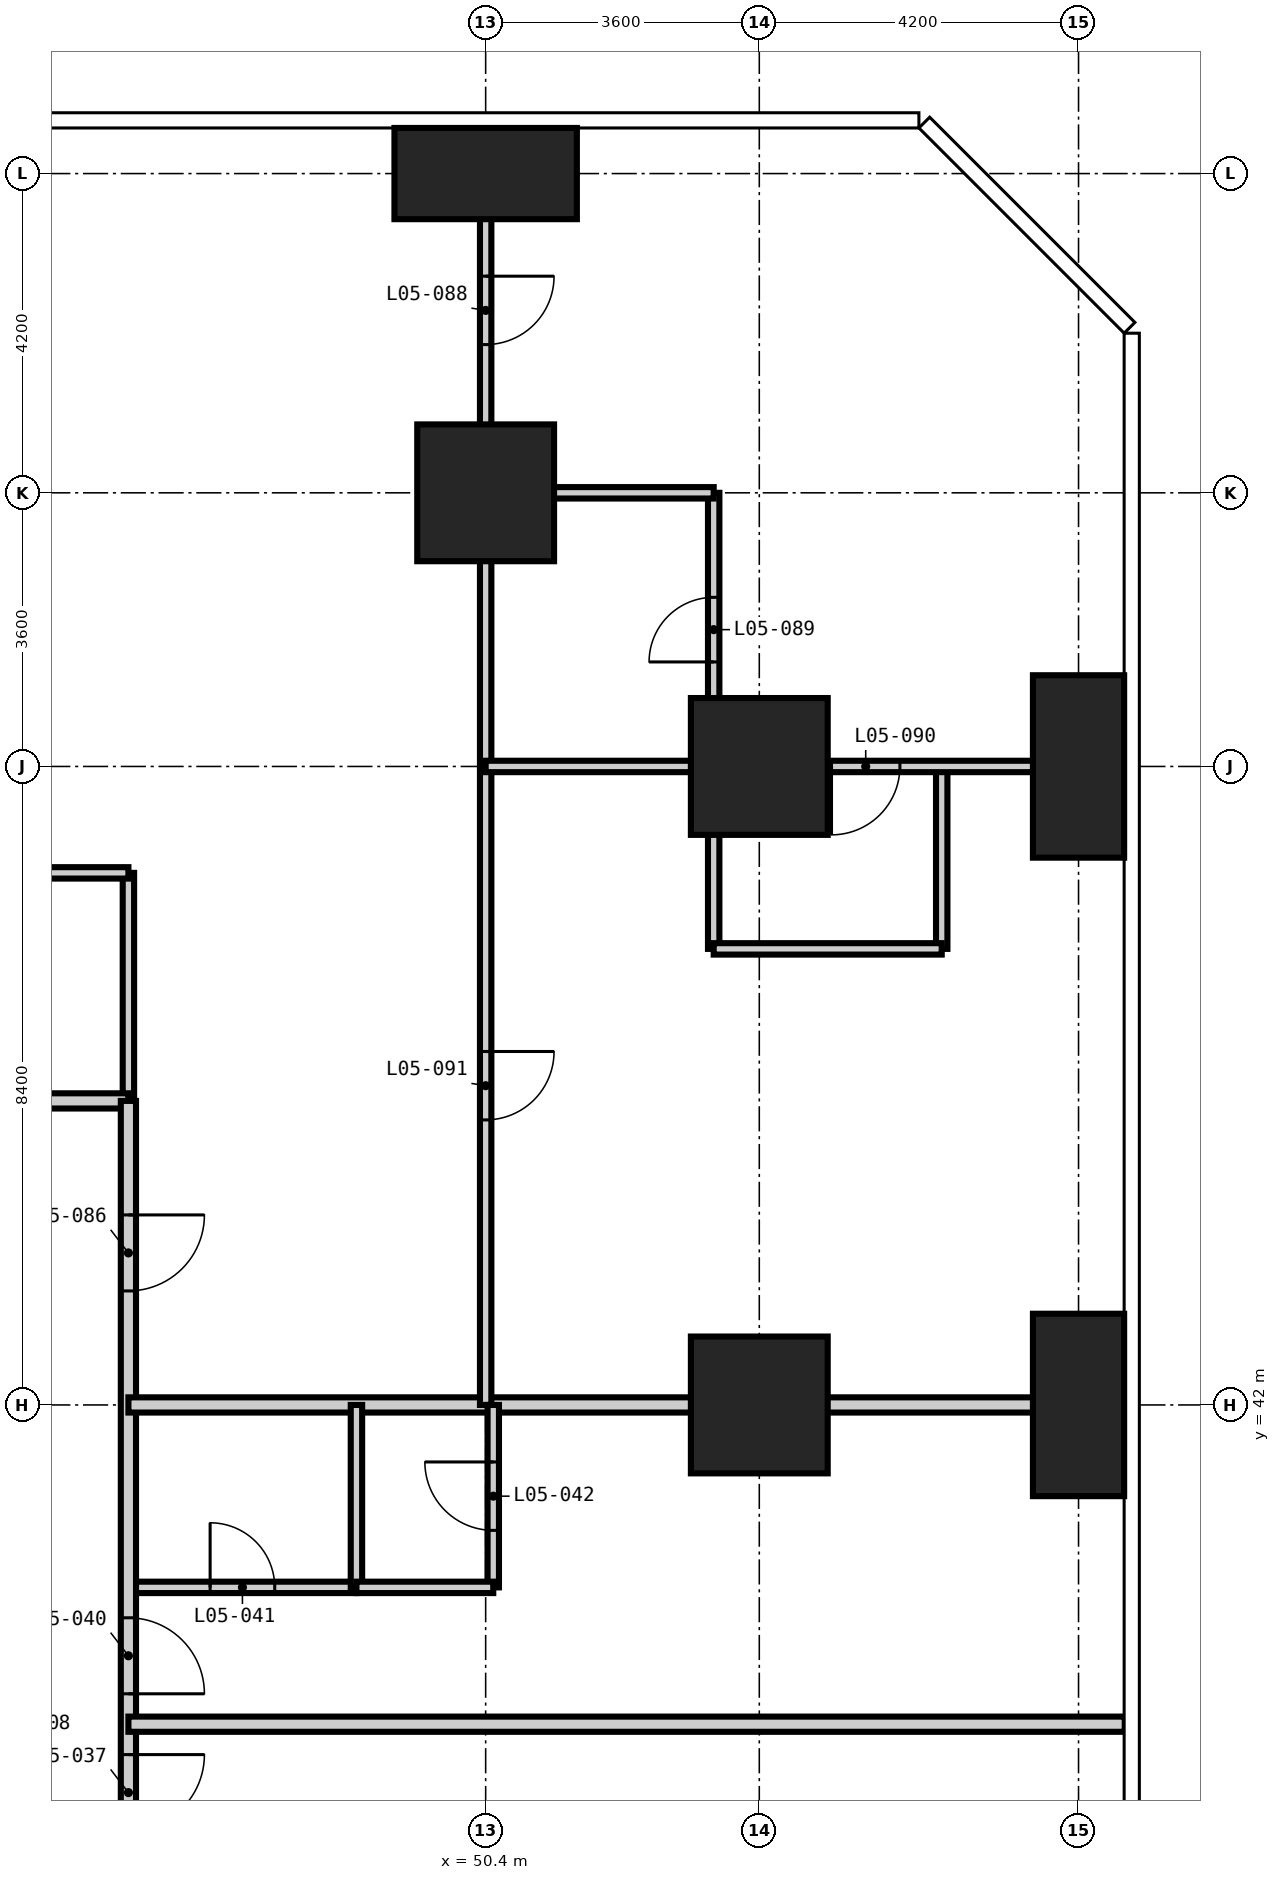
"""IFC4 building model, lengths in metres.
Left out: names, types, materials, properties, quantities, classifications, styles, units other than length and angle.
Written with IfcOpenShell. Run it as: python <this file> out.ifc"""

import sys

from ifc_helpers import new_model, si_unit, direction, frame, frame_2d, origin, origin_2d, place, context, subcontext, project, spatial, rectangle, extrude, element, fill, save


model = new_model("IFC4")
c1 = context("Model", 3, precision=1e-05, world=origin(), true_north=direction((0.0, 1.0)))
c2 = subcontext(c1, "Body", "Model", "MODEL_VIEW")
j1 = project(units=[si_unit("LENGTHUNIT", "METRE"), si_unit("PLANEANGLEUNIT", "RADIAN")], contexts=[c1])
p1 = place(None, origin())
s1 = spatial("IfcSite", under=j1, at=p1, CompositionType="ELEMENT")
p2 = place(p1, origin())
s2 = spatial("IfcBuilding", under=s1, at=p2, CompositionType="ELEMENT")
p3 = place(p2, frame((0.0, 0.0, 27.0)))
s3 = spatial("IfcBuildingStorey", under=s2, at=p3, CompositionType="ELEMENT", Elevation=27.0)
p4 = place(p3, frame((50.4, 54.0, -0.35), z_axis=(0.0, 0.0, 1.0), x_axis=(1.0, 0.0, 0.0)))
e1 = element("IfcColumn", 1, at=p4, inside=s3, PredefinedType="COLUMN", context=c2, shape_type="SweptSolid", body=[
    extrude(rectangle(XDim=1.8, YDim=1.8, at=origin_2d()), origin(), (0.0, 0.0, 1.0), 3.6),
])
p5 = place(p3, frame((50.4, 58.2, -0.35), z_axis=(0.0, 0.0, 1.0), x_axis=(1.0, 0.0, 0.0)))
e2 = element("IfcColumn", 2, at=p5, inside=s3, PredefinedType="COLUMN", context=c2, shape_type="SweptSolid", body=[
    extrude(rectangle(XDim=2.4, YDim=1.2, at=origin_2d()), origin(), (0.0, 0.0, 1.0), 3.6),
])
for number, where, z_axis, x_axis in (
    (3, (54.0, 42.0, -0.35), (0.0, 0.0, 1.0), (1.0, 0.0, 0.0)),
    (4, (54.0, 50.4, -0.35), (0.0, 0.0, 1.0), (1.0, 0.0, 0.0)),
):
    element("IfcColumn", number, at=place(p3, frame(where, z_axis=z_axis, x_axis=x_axis)), inside=s3, PredefinedType="COLUMN", context=c2, shape_type="SweptSolid", body=[
        extrude(rectangle(XDim=1.8, YDim=1.8, at=origin_2d()), origin(), (0.0, 0.0, 1.0), 3.6),
    ])
for number, where, z_axis, x_axis in (
    (5, (58.2, 42.0, -0.35), (0.0, 0.0, 1.0), (1.0, 0.0, 0.0)),
    (6, (58.2, 50.4, -0.35), (0.0, 0.0, 1.0), (1.0, 0.0, 0.0)),
):
    element("IfcColumn", number, at=place(p3, frame(where, z_axis=z_axis, x_axis=x_axis)), inside=s3, PredefinedType="COLUMN", context=c2, shape_type="SweptSolid", body=[
        extrude(rectangle(XDim=1.2, YDim=2.4, at=origin_2d()), origin(), (0.0, 0.0, 1.0), 3.6),
    ])
p6 = place(p3, frame((45.7, 46.0, 0.0), z_axis=(0.0, 0.0, 1.0), x_axis=(0.0, 1.0, 0.0)))
e7 = element("IfcWall", 7, at=p6, inside=s3, PredefinedType="PARTITIONING", context=c2, shape_type="SweptSolid", body=[
    extrude(rectangle(XDim=3.0, YDim=0.15, at=frame_2d((1.5, 0.0))), origin(), (0.0, 0.0, 1.0), 3.25),
])
p7 = place(p3, frame((53.4, 50.4, 0.0), z_axis=(0.0, 0.0, 1.0), x_axis=(0.0, 1.0, 0.0)))
e8 = element("IfcWall", 8, at=p7, inside=s3, PredefinedType="PARTITIONING", context=c2, shape_type="SweptSolid", body=[
    extrude(rectangle(XDim=3.6, YDim=0.15, at=frame_2d((1.8, 0.0))), origin(), (0.0, 0.0, 1.0), 3.25),
])
p8 = place(p7, frame((1.375, 0.0, 0.0)))
e9 = element("IfcOpeningElement", 9, at=p8, cuts=e8, PredefinedType="OPENING", context=c2, shape_type="SweptSolid", body=[
    extrude(rectangle(XDim=0.85, YDim=2.1, at=frame_2d((0.425, 1.05))), frame((0.0, 0.085, 0.0), z_axis=(0.0, -1.0, 0.0), x_axis=(1.0, 0.0, 0.0)), (0.0, 0.0, 1.0), 0.17),
])
p9 = place(p3, frame((45.7, 39.6, 0.0), z_axis=(0.0, 0.0, 1.0), x_axis=(1.0, 0.0, 0.0)))
e10 = element("IfcWall", 10, at=p9, inside=s3, PredefinedType="PARTITIONING", context=c2, shape_type="SweptSolid", body=[
    extrude(rectangle(XDim=3.0, YDim=0.15, at=frame_2d((1.5, 0.0))), origin(), (0.0, 0.0, 1.0), 3.25),
])
p10 = place(p9, frame((1.075, 0.0, 0.0)))
e11 = element("IfcOpeningElement", 11, at=p10, cuts=e10, PredefinedType="OPENING", context=c2, shape_type="SweptSolid", body=[
    extrude(rectangle(XDim=0.85, YDim=2.1, at=frame_2d((0.425, 1.05))), frame((0.0, 0.085, 0.0), z_axis=(0.0, -1.0, 0.0), x_axis=(1.0, 0.0, 0.0)), (0.0, 0.0, 1.0), 0.17),
])
p11 = place(p3, frame((42.0, 49.0, 0.0), z_axis=(0.0, 0.0, 1.0), x_axis=(1.0, 0.0, 0.0)))
e12 = element("IfcWall", 12, at=p11, inside=s3, PredefinedType="PARTITIONING", context=c2, shape_type="SweptSolid", body=[
    extrude(rectangle(XDim=3.7, YDim=0.15, at=frame_2d((1.85, 0.0))), origin(), (0.0, 0.0, 1.0), 3.25),
])
p12 = place(p11, frame((1.425, 0.0, 0.0)))
e13 = element("IfcOpeningElement", 13, at=p12, cuts=e12, PredefinedType="OPENING", context=c2, shape_type="SweptSolid", body=[
    extrude(rectangle(XDim=0.85, YDim=2.1, at=frame_2d((0.425, 1.05))), frame((0.0, 0.085, 0.0), z_axis=(0.0, -1.0, 0.0), x_axis=(1.0, 0.0, 0.0)), (0.0, 0.0, 1.0), 0.17),
])
p13 = place(p3, frame((50.4, 54.0, 0.0), z_axis=(0.0, 0.0, 1.0), x_axis=(1.0, 0.0, 0.0)))
e14 = element("IfcWall", 14, at=p13, inside=s3, PredefinedType="PARTITIONING", context=c2, shape_type="SweptSolid", body=[
    extrude(rectangle(XDim=3.0, YDim=0.15, at=frame_2d((1.5, 0.0))), origin(), (0.0, 0.0, 1.0), 3.25),
])
p14 = place(p3, frame((13.4, 46.0, 0.0), z_axis=(0.0, 0.0, 1.0), x_axis=(1.0, 0.0, 0.0)))
e15 = element("IfcWall", 15, at=p14, inside=s3, PredefinedType="PARTITIONING", context=c2, shape_type="SweptSolid", body=[
    extrude(rectangle(XDim=32.3, YDim=0.2, at=frame_2d((16.15, 0.0))), origin(), (0.0, 0.0, 1.0), 3.25),
])
p15 = place(p14, frame((6.2, 0.0, 0.0)))
e16 = element("IfcOpeningElement", 16, at=p15, cuts=e15, PredefinedType="OPENING", context=c2, shape_type="SweptSolid", body=[
    extrude(rectangle(XDim=1.0, YDim=2.2, at=frame_2d((0.5, 1.1))), frame((0.0, 0.11, 0.0), z_axis=(0.0, -1.0, 0.0), x_axis=(1.0, 0.0, 0.0)), (0.0, 0.0, 1.0), 0.22),
])
p16 = place(p14, frame((8.0, 0.0, 0.0)))
e17 = element("IfcOpeningElement", 17, at=p16, cuts=e15, PredefinedType="OPENING", context=c2, shape_type="SweptSolid", body=[
    extrude(rectangle(XDim=1.0, YDim=2.2, at=frame_2d((0.5, 1.1))), frame((0.0, 0.11, 0.0), z_axis=(0.0, -1.0, 0.0), x_axis=(1.0, 0.0, 0.0)), (0.0, 0.0, 1.0), 0.22),
])
p17 = place(p14, frame((14.6, 0.0, 0.0)))
e18 = element("IfcOpeningElement", 18, at=p17, cuts=e15, PredefinedType="OPENING", context=c2, shape_type="SweptSolid", body=[
    extrude(rectangle(XDim=1.0, YDim=2.2, at=frame_2d((0.5, 1.1))), frame((0.0, 0.11, 0.0), z_axis=(0.0, -1.0, 0.0), x_axis=(1.0, 0.0, 0.0)), (0.0, 0.0, 1.0), 0.22),
])
p18 = place(p14, frame((16.4, 0.0, 0.0)))
e19 = element("IfcOpeningElement", 19, at=p18, cuts=e15, PredefinedType="OPENING", context=c2, shape_type="SweptSolid", body=[
    extrude(rectangle(XDim=1.0, YDim=2.2, at=frame_2d((0.5, 1.1))), frame((0.0, 0.11, 0.0), z_axis=(0.0, -1.0, 0.0), x_axis=(1.0, 0.0, 0.0)), (0.0, 0.0, 1.0), 0.22),
])
p19 = place(p14, frame((23.0, 0.0, 0.0)))
e20 = element("IfcOpeningElement", 20, at=p19, cuts=e15, PredefinedType="OPENING", context=c2, shape_type="SweptSolid", body=[
    extrude(rectangle(XDim=1.0, YDim=2.2, at=frame_2d((0.5, 1.1))), frame((0.0, 0.11, 0.0), z_axis=(0.0, -1.0, 0.0), x_axis=(1.0, 0.0, 0.0)), (0.0, 0.0, 1.0), 0.22),
])
p20 = place(p14, frame((24.8, 0.0, 0.0)))
e21 = element("IfcOpeningElement", 21, at=p20, cuts=e15, PredefinedType="OPENING", context=c2, shape_type="SweptSolid", body=[
    extrude(rectangle(XDim=1.0, YDim=2.2, at=frame_2d((0.5, 1.1))), frame((0.0, 0.11, 0.0), z_axis=(0.0, -1.0, 0.0), x_axis=(1.0, 0.0, 0.0)), (0.0, 0.0, 1.0), 0.22),
])
p21 = place(p3, frame((45.7, 46.0, 0.0), z_axis=(0.0, 0.0, 1.0), x_axis=(0.0, -1.0, 0.0)))
e22 = element("IfcWall", 22, at=p21, inside=s3, PredefinedType="PARTITIONING", context=c2, shape_type="SweptSolid", body=[
    extrude(rectangle(XDim=32.6, YDim=0.2, at=frame_2d((16.3, 0.0))), origin(), (0.0, 0.0, 1.0), 3.25),
])
p22 = place(p21, frame((26.6, 0.0, 0.0)))
e23 = element("IfcOpeningElement", 23, at=p22, cuts=e22, PredefinedType="OPENING", context=c2, shape_type="SweptSolid", body=[
    extrude(rectangle(XDim=1.0, YDim=2.2, at=frame_2d((0.5, 1.1))), frame((0.0, 0.11, 0.0), z_axis=(0.0, -1.0, 0.0), x_axis=(1.0, 0.0, 0.0)), (0.0, 0.0, 1.0), 0.22),
])
p23 = place(p21, frame((22.4, 0.0, 0.0)))
e24 = element("IfcOpeningElement", 24, at=p23, cuts=e22, PredefinedType="OPENING", context=c2, shape_type="SweptSolid", body=[
    extrude(rectangle(XDim=1.0, YDim=2.2, at=frame_2d((0.5, 1.1))), frame((0.0, 0.11, 0.0), z_axis=(0.0, -1.0, 0.0), x_axis=(1.0, 0.0, 0.0)), (0.0, 0.0, 1.0), 0.22),
])
p24 = place(p21, frame((17.0, 0.0, 0.0)))
e25 = element("IfcOpeningElement", 25, at=p24, cuts=e22, PredefinedType="OPENING", context=c2, shape_type="SweptSolid", body=[
    extrude(rectangle(XDim=1.0, YDim=2.2, at=frame_2d((0.5, 1.1))), frame((0.0, 0.11, 0.0), z_axis=(0.0, -1.0, 0.0), x_axis=(1.0, 0.0, 0.0)), (0.0, 0.0, 1.0), 0.22),
])
p25 = place(p21, frame((15.2, 0.0, 0.0)))
e26 = element("IfcOpeningElement", 26, at=p25, cuts=e22, PredefinedType="OPENING", context=c2, shape_type="SweptSolid", body=[
    extrude(rectangle(XDim=1.0, YDim=2.2, at=frame_2d((0.5, 1.1))), frame((0.0, 0.11, 0.0), z_axis=(0.0, -1.0, 0.0), x_axis=(1.0, 0.0, 0.0)), (0.0, 0.0, 1.0), 0.22),
])
p26 = place(p21, frame((8.6, 0.0, 0.0)))
e27 = element("IfcOpeningElement", 27, at=p26, cuts=e22, PredefinedType="OPENING", context=c2, shape_type="SweptSolid", body=[
    extrude(rectangle(XDim=1.0, YDim=2.2, at=frame_2d((0.5, 1.1))), frame((0.0, 0.11, 0.0), z_axis=(0.0, -1.0, 0.0), x_axis=(1.0, 0.0, 0.0)), (0.0, 0.0, 1.0), 0.22),
])
p27 = place(p21, frame((6.8, 0.0, 0.0)))
e28 = element("IfcOpeningElement", 28, at=p27, cuts=e22, PredefinedType="OPENING", context=c2, shape_type="SweptSolid", body=[
    extrude(rectangle(XDim=1.0, YDim=2.2, at=frame_2d((0.5, 1.1))), frame((0.0, 0.11, 0.0), z_axis=(0.0, -1.0, 0.0), x_axis=(1.0, 0.0, 0.0)), (0.0, 0.0, 1.0), 0.22),
])
p28 = place(p21, frame((30.4, 0.0, 0.0)))
e29 = element("IfcOpeningElement", 29, at=p28, cuts=e22, PredefinedType="OPENING", context=c2, shape_type="SweptSolid", body=[
    extrude(rectangle(XDim=1.0, YDim=2.2, at=frame_2d((0.5, 1.1))), frame((0.0, 0.11, 0.0), z_axis=(0.0, -1.0, 0.0), x_axis=(1.0, 0.0, 0.0)), (0.0, 0.0, 1.0), 0.22),
])
p29 = place(p21, frame((1.5, 0.0, 0.0)))
e30 = element("IfcOpeningElement", 30, at=p29, cuts=e22, PredefinedType="OPENING", context=c2, shape_type="SweptSolid", body=[
    extrude(rectangle(XDim=1.0, YDim=2.2, at=frame_2d((0.5, 1.1))), frame((0.0, 0.11, 0.0), z_axis=(0.0, -1.0, 0.0), x_axis=(1.0, 0.0, 0.0)), (0.0, 0.0, 1.0), 0.22),
])
for number, where, z_axis, x_axis in (
    (31, (45.7, 37.8, 0.0), (0.0, 0.0, 1.0), (1.0, 0.0, 0.0)),
    (32, (45.7, 42.0, 0.0), (0.0, 0.0, 1.0), (1.0, 0.0, 0.0)),
):
    element("IfcWall", number, at=place(p3, frame(where, z_axis=z_axis, x_axis=x_axis)), inside=s3, PredefinedType="PARTITIONING", context=c2, shape_type="SweptSolid", body=[
        extrude(rectangle(XDim=13.108, YDim=0.2, at=frame_2d((6.554, 0.0))), origin(), (0.0, 0.0, 1.0), 3.25),
    ])
p30 = place(p3, frame((48.7, 39.6, 0.0), z_axis=(0.0, 0.0, 1.0), x_axis=(0.0, 1.0, 0.0)))
e33 = element("IfcWall", 33, at=p30, inside=s3, PredefinedType="PARTITIONING", context=c2, shape_type="SweptSolid", body=[
    extrude(rectangle(XDim=2.4, YDim=0.15, at=frame_2d((1.2, 0.0))), origin(), (0.0, 0.0, 1.0), 3.25),
])
p31 = place(p3, frame((50.4, 42.0, 0.0), z_axis=(0.0, 0.0, 1.0), x_axis=(0.0, 1.0, 0.0)))
e34 = element("IfcWall", 34, at=p31, inside=s3, PredefinedType="PARTITIONING", context=c2, shape_type="SweptSolid", body=[
    extrude(rectangle(XDim=16.808, YDim=0.15, at=frame_2d((8.404, 0.0))), origin(), (0.0, 0.0, 1.0), 3.25),
])
p32 = place(p31, frame((13.95, 0.0, 0.0)))
e35 = element("IfcOpeningElement", 35, at=p32, cuts=e34, PredefinedType="OPENING", context=c2, shape_type="SweptSolid", body=[
    extrude(rectangle(XDim=0.9, YDim=2.1, at=frame_2d((0.45, 1.05))), frame((0.0, 0.085, 0.0), z_axis=(0.0, -1.0, 0.0), x_axis=(1.0, 0.0, 0.0)), (0.0, 0.0, 1.0), 0.17),
])
p33 = place(p31, frame((3.75, 0.0, 0.0)))
e36 = element("IfcOpeningElement", 36, at=p33, cuts=e34, PredefinedType="OPENING", context=c2, shape_type="SweptSolid", body=[
    extrude(rectangle(XDim=0.9, YDim=2.1, at=frame_2d((0.45, 1.05))), frame((0.0, 0.085, 0.0), z_axis=(0.0, -1.0, 0.0), x_axis=(1.0, 0.0, 0.0)), (0.0, 0.0, 1.0), 0.17),
])
p34 = place(p3, frame((50.5, 39.6, 0.0), z_axis=(0.0, 0.0, 1.0), x_axis=(0.0, 1.0, 0.0)))
e37 = element("IfcWall", 37, at=p34, inside=s3, PredefinedType="PARTITIONING", context=c2, shape_type="SweptSolid", body=[
    extrude(rectangle(XDim=2.4, YDim=0.15, at=frame_2d((1.2, 0.0))), origin(), (0.0, 0.0, 1.0), 3.25),
])
p35 = place(p34, frame((0.75, 0.0, 0.0)))
e38 = element("IfcOpeningElement", 38, at=p35, cuts=e37, PredefinedType="OPENING", context=c2, shape_type="SweptSolid", body=[
    extrude(rectangle(XDim=0.9, YDim=2.1, at=frame_2d((0.45, 1.05))), frame((0.0, 0.085, 0.0), z_axis=(0.0, -1.0, 0.0), x_axis=(1.0, 0.0, 0.0)), (0.0, 0.0, 1.0), 0.17),
])
for number, where, z_axis, x_axis in (
    (39, (53.4, 48.0, 0.0), (0.0, 0.0, 1.0), (0.0, 1.0, 0.0)),
    (40, (56.4, 48.0, 0.0), (0.0, 0.0, 1.0), (0.0, 1.0, 0.0)),
):
    element("IfcWall", number, at=place(p3, frame(where, z_axis=z_axis, x_axis=x_axis)), inside=s3, PredefinedType="PARTITIONING", context=c2, shape_type="SweptSolid", body=[
        extrude(rectangle(XDim=2.4, YDim=0.15, at=frame_2d((1.2, 0.0))), origin(), (0.0, 0.0, 1.0), 3.25),
    ])
p36 = place(p3, frame((48.7, 39.6, 0.0), z_axis=(0.0, 0.0, 1.0), x_axis=(1.0, 0.0, 0.0)))
e41 = element("IfcWall", 41, at=p36, inside=s3, PredefinedType="PARTITIONING", context=c2, shape_type="SweptSolid", body=[
    extrude(rectangle(XDim=1.8, YDim=0.15, at=frame_2d((0.9, 0.0))), origin(), (0.0, 0.0, 1.0), 3.25),
])
p37 = place(p3, frame((53.4, 48.0, 0.0), z_axis=(0.0, 0.0, 1.0), x_axis=(1.0, 0.0, 0.0)))
e42 = element("IfcWall", 42, at=p37, inside=s3, PredefinedType="PARTITIONING", context=c2, shape_type="SweptSolid", body=[
    extrude(rectangle(XDim=3.0, YDim=0.15, at=frame_2d((1.5, 0.0))), origin(), (0.0, 0.0, 1.0), 3.25),
])
p38 = place(p3, frame((50.4, 50.4, 0.0), z_axis=(0.0, 0.0, 1.0), x_axis=(1.0, 0.0, 0.0)))
e43 = element("IfcWall", 43, at=p38, inside=s3, PredefinedType="PARTITIONING", context=c2, shape_type="SweptSolid", body=[
    extrude(rectangle(XDim=8.408, YDim=0.15, at=frame_2d((4.204, 0.0))), origin(), (0.0, 0.0, 1.0), 3.25),
])
p39 = place(p38, frame((4.55, 0.0, 0.0)))
e44 = element("IfcOpeningElement", 44, at=p39, cuts=e43, PredefinedType="OPENING", context=c2, shape_type="SweptSolid", body=[
    extrude(rectangle(XDim=0.9, YDim=2.1, at=frame_2d((0.45, 1.05))), frame((0.0, 0.085, 0.0), z_axis=(0.0, -1.0, 0.0), x_axis=(1.0, 0.0, 0.0)), (0.0, 0.0, 1.0), 0.17),
])
p40 = place(p26, origin())
e45 = element("IfcDoor", 45, at=p40, inside=s3, OperationType="SINGLE_SWING_LEFT", PredefinedType="DOOR", context=c2, shape_type="SweptSolid", body=[
    extrude(rectangle(XDim=1.0, YDim=2.2, at=frame_2d((0.5, 1.1))), frame((0.0, 0.025, 0.0), z_axis=(0.0, -1.0, 0.0), x_axis=(1.0, 0.0, 0.0)), (0.0, 0.0, 1.0), 0.05),
])
fill(e27, e45)
p41 = place(p27, origin())
e46 = element("IfcDoor", 46, at=p41, inside=s3, OperationType="SINGLE_SWING_RIGHT", PredefinedType="DOOR", context=c2, shape_type="SweptSolid", body=[
    extrude(rectangle(XDim=1.0, YDim=2.2, at=frame_2d((0.5, 1.1))), frame((0.0, 0.025, 0.0), z_axis=(0.0, -1.0, 0.0), x_axis=(1.0, 0.0, 0.0)), (0.0, 0.0, 1.0), 0.05),
])
fill(e28, e46)
p42 = place(p10, origin())
e47 = element("IfcDoor", 47, at=p42, inside=s3, OperationType="SINGLE_SWING_LEFT", PredefinedType="DOOR", context=c2, shape_type="SweptSolid", body=[
    extrude(rectangle(XDim=0.85, YDim=2.1, at=frame_2d((0.425, 1.05))), frame((0.0, 0.025, 0.0), z_axis=(0.0, -1.0, 0.0), x_axis=(1.0, 0.0, 0.0)), (0.0, 0.0, 1.0), 0.05),
])
fill(e11, e47)
p43 = place(p35, origin())
e48 = element("IfcDoor", 48, at=p43, inside=s3, OperationType="SINGLE_SWING_RIGHT", PredefinedType="DOOR", context=c2, shape_type="SweptSolid", body=[
    extrude(rectangle(XDim=0.9, YDim=2.1, at=frame_2d((0.45, 1.05))), frame((0.0, 0.025, 0.0), z_axis=(0.0, -1.0, 0.0), x_axis=(1.0, 0.0, 0.0)), (0.0, 0.0, 1.0), 0.05),
])
fill(e38, e48)
p44 = place(p29, origin())
e49 = element("IfcDoor", 49, at=p44, inside=s3, OperationType="SINGLE_SWING_LEFT", PredefinedType="DOOR", context=c2, shape_type="SweptSolid", body=[
    extrude(rectangle(XDim=1.0, YDim=2.2, at=frame_2d((0.5, 1.1))), frame((0.0, 0.025, 0.0), z_axis=(0.0, -1.0, 0.0), x_axis=(1.0, 0.0, 0.0)), (0.0, 0.0, 1.0), 0.05),
])
fill(e30, e49)
p45 = place(p32, frame((0.9, 0.0, 0.0), z_axis=(0.0, 0.0, 1.0), x_axis=(-1.0, 0.0, 0.0)))
e50 = element("IfcDoor", 50, at=p45, inside=s3, OperationType="SINGLE_SWING_LEFT", PredefinedType="DOOR", context=c2, shape_type="SweptSolid", body=[
    extrude(rectangle(XDim=0.9, YDim=2.1, at=frame_2d((0.45, 1.05))), frame((0.0, 0.025, 0.0), z_axis=(0.0, -1.0, 0.0), x_axis=(1.0, 0.0, 0.0)), (0.0, 0.0, 1.0), 0.05),
])
fill(e35, e50)
p46 = place(p8, origin())
e51 = element("IfcDoor", 51, at=p46, inside=s3, OperationType="SINGLE_SWING_LEFT", PredefinedType="DOOR", context=c2, shape_type="SweptSolid", body=[
    extrude(rectangle(XDim=0.85, YDim=2.1, at=frame_2d((0.425, 1.05))), frame((0.0, 0.025, 0.0), z_axis=(0.0, -1.0, 0.0), x_axis=(1.0, 0.0, 0.0)), (0.0, 0.0, 1.0), 0.05),
])
fill(e9, e51)
p47 = place(p39, frame((0.9, 0.0, 0.0), z_axis=(0.0, 0.0, 1.0), x_axis=(-1.0, 0.0, 0.0)))
e52 = element("IfcDoor", 52, at=p47, inside=s3, OperationType="SINGLE_SWING_RIGHT", PredefinedType="DOOR", context=c2, shape_type="SweptSolid", body=[
    extrude(rectangle(XDim=0.9, YDim=2.1, at=frame_2d((0.45, 1.05))), frame((0.0, 0.025, 0.0), z_axis=(0.0, -1.0, 0.0), x_axis=(1.0, 0.0, 0.0)), (0.0, 0.0, 1.0), 0.05),
])
fill(e44, e52)
p48 = place(p33, frame((0.9, 0.0, 0.0), z_axis=(0.0, 0.0, 1.0), x_axis=(-1.0, 0.0, 0.0)))
e53 = element("IfcDoor", 53, at=p48, inside=s3, OperationType="SINGLE_SWING_LEFT", PredefinedType="DOOR", context=c2, shape_type="SweptSolid", body=[
    extrude(rectangle(XDim=0.9, YDim=2.1, at=frame_2d((0.45, 1.05))), frame((0.0, 0.025, 0.0), z_axis=(0.0, -1.0, 0.0), x_axis=(1.0, 0.0, 0.0)), (0.0, 0.0, 1.0), 0.05),
])
fill(e36, e53)
save(model, sys.argv[1])
